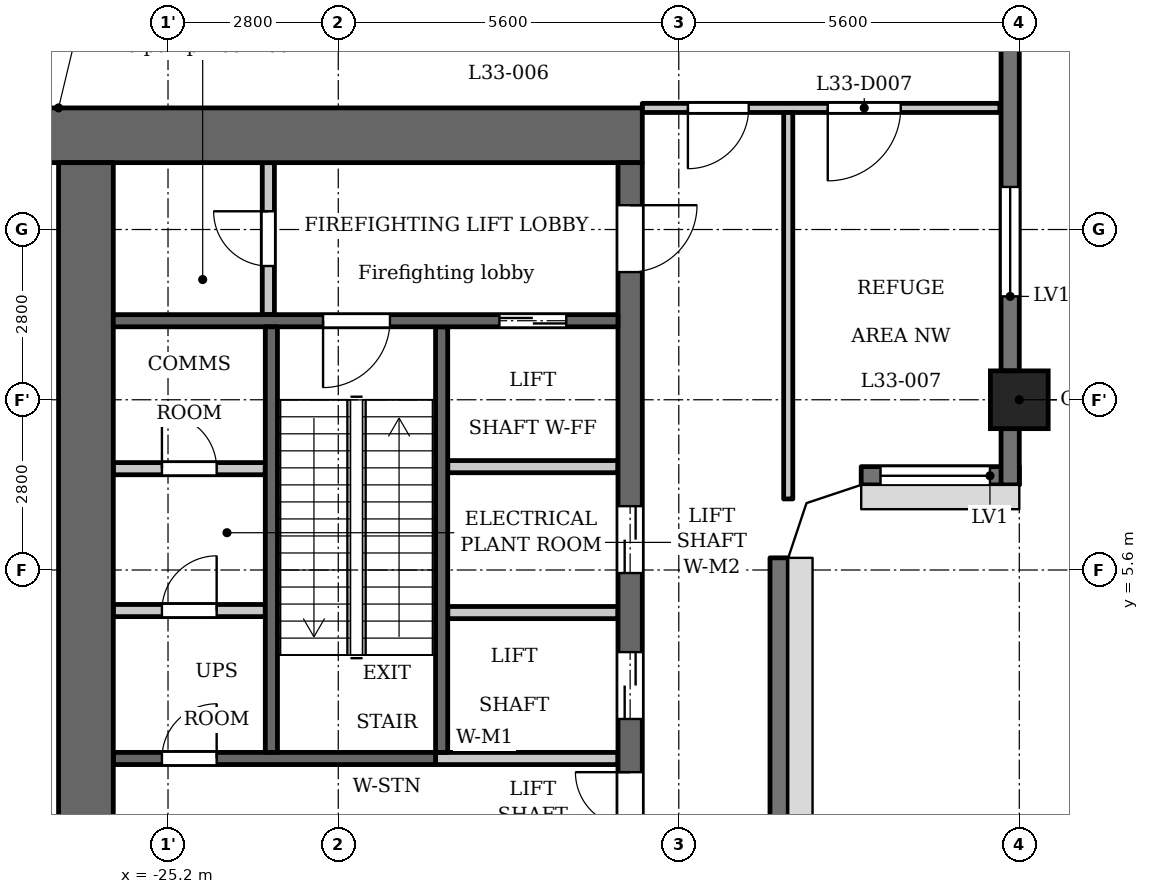
"""IFC4 building model, lengths in metres.
Left out: names, types, materials, properties, quantities, classifications, styles, units other than length and angle.
Written with IfcOpenShell. Run it as: python <this file> out.ifc"""

import sys

from ifc_helpers import new_model, si_unit, direction, frame, frame_2d, origin, origin_2d, place, context, subcontext, project, spatial, polyline, rectangle, outline, extrude, element, fill, save


model = new_model("IFC4")
c1 = context("Model", 3, precision=1e-05, world=origin(), true_north=direction((0.0, 1.0)))
c2 = subcontext(c1, "Body", "Model", "MODEL_VIEW")
j1 = project(units=[si_unit("LENGTHUNIT", "METRE"), si_unit("PLANEANGLEUNIT", "RADIAN")], contexts=[c1])
p1 = place(None, origin())
s1 = spatial("IfcSite", under=j1, at=p1, CompositionType="ELEMENT")
p2 = place(p1, origin())
s2 = spatial("IfcBuilding", under=s1, at=p2, CompositionType="ELEMENT")
p3 = place(p2, frame((0.0, 0.0, 130.7)))
s3 = spatial("IfcBuildingStorey", under=s2, at=p3, CompositionType="ELEMENT", Elevation=130.7)
p4 = place(p3, frame((-11.2, 8.4, 0.0), z_axis=(0.0, 0.0, 1.0), x_axis=(1.0, 0.0, 0.0)))
e1 = element("IfcColumn", 1, at=p4, inside=s3, PredefinedType="COLUMN", context=c2, shape_type="SweptSolid", body=[
    extrude(rectangle(XDim=0.95, YDim=0.95, at=origin_2d()), origin(), (0.0, 0.0, 1.0), 5.4),
])
p5 = place(p3, frame((-15.15, -5.8, 0.0), z_axis=(0.0, 0.0, 1.0), x_axis=(0.0, 1.0, 0.0)))
e2 = element("IfcWall", 2, at=p5, inside=s3, PredefinedType="SOLIDWALL", context=c2, shape_type="SweptSolid", body=[
    extrude(rectangle(XDim=11.6, YDim=0.3, at=frame_2d((5.8, 0.0))), origin(), (0.0, 0.0, 1.0), 5.1),
])
p6 = place(p3, frame((-13.8, 7.15, 0.0), z_axis=(0.0, 0.0, 1.0), x_axis=(1.0, 0.0, 0.0)))
e3 = element("IfcWall", 3, at=p6, inside=s3, PredefinedType="SOLIDWALL", context=c2, shape_type="SweptSolid", body=[
    extrude(rectangle(XDim=2.6, YDim=0.3, at=frame_2d((1.3, 0.0))), origin(), (0.0, 0.0, 1.0), 5.1),
])
p7 = place(p6, frame((0.317, 0.0, 0.9)))
e4 = element("IfcOpeningElement", 4, at=p7, cuts=e3, PredefinedType="OPENING", context=c2, shape_type="SweptSolid", body=[
    extrude(rectangle(XDim=1.8, YDim=1.5, at=frame_2d((0.9, 0.75))), frame((0.0, 0.16, 0.0), z_axis=(0.0, -1.0, 0.0), x_axis=(1.0, 0.0, 0.0)), (0.0, 0.0, 1.0), 0.32),
])
p8 = place(p3, frame((-11.35, 7.0, 0.0), z_axis=(0.0, 0.0, 1.0), x_axis=(0.0, 1.0, 0.0)))
e5 = element("IfcWall", 5, at=p8, inside=s3, PredefinedType="SOLIDWALL", context=c2, shape_type="SweptSolid", body=[
    extrude(rectangle(XDim=0.925, YDim=0.3, at=frame_2d((0.462, 0.0))), origin(), (0.0, 0.0, 1.0), 5.1),
])
p9 = place(p3, frame((-11.35, 8.875, 0.0), z_axis=(0.0, 0.0, 1.0), x_axis=(0.0, 1.0, 0.0)))
e6 = element("IfcWall", 6, at=p9, inside=s3, PredefinedType="SOLIDWALL", context=c2, shape_type="SweptSolid", body=[
    extrude(rectangle(XDim=6.1, YDim=0.3, at=frame_2d((3.05, 0.0))), origin(), (0.0, 0.0, 1.0), 5.1),
])
p10 = place(p9, frame((1.225, 0.0, 0.9)))
e7 = element("IfcOpeningElement", 7, at=p10, cuts=e6, PredefinedType="OPENING", context=c2, shape_type="SweptSolid", body=[
    extrude(rectangle(XDim=1.8, YDim=1.5, at=frame_2d((0.9, 0.75))), frame((0.0, 0.16, 0.0), z_axis=(0.0, -1.0, 0.0), x_axis=(1.0, 0.0, 0.0)), (0.0, 0.0, 1.0), 0.32),
])
p11 = place(p3, frame((-20.7, 2.6, 0.0), z_axis=(0.0, 0.0, 1.0), x_axis=(0.0, 1.0, 0.0)))
e8 = element("IfcWall", 8, at=p11, inside=s3, PredefinedType="SHEAR", context=c2, shape_type="SweptSolid", body=[
    extrude(rectangle(XDim=7.0, YDim=0.2, at=frame_2d((3.5, 0.0))), origin(), (0.0, 0.0, 1.0), 5.1),
])
p12 = place(p3, frame((-20.8, 2.5, 0.0), z_axis=(0.0, 0.0, 1.0), x_axis=(-1.0, 0.0, 0.0)))
e9 = element("IfcWall", 9, at=p12, inside=s3, PredefinedType="SHEAR", context=c2, shape_type="SweptSolid", body=[
    extrude(rectangle(XDim=5.3, YDim=0.2, at=frame_2d((2.65, 0.0))), origin(), (0.0, 0.0, 1.0), 5.1),
])
p13 = place(p12, frame((3.6, 0.0, 0.0)))
e10 = element("IfcOpeningElement", 10, at=p13, cuts=e9, PredefinedType="OPENING", context=c2, shape_type="SweptSolid", body=[
    extrude(rectangle(XDim=0.9, YDim=2.1, at=frame_2d((0.45, 1.05))), frame((0.0, 0.11, 0.0), z_axis=(0.0, -1.0, 0.0), x_axis=(1.0, 0.0, 0.0)), (0.0, 0.0, 1.0), 0.22),
])
p14 = place(p3, frame((-17.4, 12.75, 0.0), z_axis=(0.0, 0.0, 1.0), x_axis=(-1.0, 0.0, 0.0)))
e11 = element("IfcWall", 11, at=p14, inside=s3, PredefinedType="SHEAR", context=c2, shape_type="SweptSolid", body=[
    extrude(rectangle(XDim=10.4, YDim=0.9, at=frame_2d((5.2, 0.0))), origin(), (0.0, 0.0, 1.0), 5.1),
])
p15 = place(p3, frame((-17.6, -12.3, 0.0), z_axis=(0.0, 0.0, 1.0), x_axis=(0.0, 1.0, 0.0)))
e12 = element("IfcWall", 12, at=p15, inside=s3, PredefinedType="SHEAR", context=c2, shape_type="SweptSolid", body=[
    extrude(rectangle(XDim=24.6, YDim=0.4, at=frame_2d((12.3, 0.0))), origin(), (0.0, 0.0, 1.0), 5.1),
])
p16 = place(p15, frame((15.45, 0.0, 0.0)))
e13 = element("IfcOpeningElement", 13, at=p16, cuts=e12, PredefinedType="OPENING", context=c2, shape_type="SweptSolid", body=[
    extrude(rectangle(XDim=1.1, YDim=2.1, at=frame_2d((0.55, 1.05))), frame((0.0, 0.21, 0.0), z_axis=(0.0, -1.0, 0.0), x_axis=(1.0, 0.0, 0.0)), (0.0, 0.0, 1.0), 0.42),
])
p17 = place(p15, frame((17.85, 0.0, 0.0)))
e14 = element("IfcOpeningElement", 14, at=p17, cuts=e12, PredefinedType="OPENING", context=c2, shape_type="SweptSolid", body=[
    extrude(rectangle(XDim=1.1, YDim=2.1, at=frame_2d((0.55, 1.05))), frame((0.0, 0.21, 0.0), z_axis=(0.0, -1.0, 0.0), x_axis=(1.0, 0.0, 0.0)), (0.0, 0.0, 1.0), 0.42),
])
p18 = place(p15, frame((22.8, 0.0, 0.0)))
e15 = element("IfcOpeningElement", 15, at=p18, cuts=e12, PredefinedType="OPENING", context=c2, shape_type="SweptSolid", body=[
    extrude(rectangle(XDim=1.1, YDim=2.1, at=frame_2d((0.55, 1.05))), frame((0.0, 0.21, 0.0), z_axis=(0.0, -1.0, 0.0), x_axis=(1.0, 0.0, 0.0)), (0.0, 0.0, 1.0), 0.42),
])
p19 = place(p15, frame((0.7, 0.0, 0.0)))
e16 = element("IfcOpeningElement", 16, at=p19, cuts=e12, PredefinedType="OPENING", context=c2, shape_type="SweptSolid", body=[
    extrude(rectangle(XDim=1.1, YDim=2.1, at=frame_2d((0.55, 1.05))), frame((0.0, 0.21, 0.0), z_axis=(0.0, -1.0, 0.0), x_axis=(1.0, 0.0, 0.0)), (0.0, 0.0, 1.0), 0.42),
])
p20 = place(p15, frame((12.775, 0.0, 0.0)))
e17 = element("IfcOpeningElement", 17, at=p20, cuts=e12, PredefinedType="OPENING", context=c2, shape_type="SweptSolid", body=[
    extrude(rectangle(XDim=1.8, YDim=2.1, at=frame_2d((0.9, 1.05))), frame((0.0, 0.21, 0.0), z_axis=(0.0, -1.0, 0.0), x_axis=(1.0, 0.0, 0.0)), (0.0, 0.0, 1.0), 0.42),
])
p21 = place(p3, frame((-26.55, -12.3, 0.0), z_axis=(0.0, 0.0, 1.0), x_axis=(0.0, 1.0, 0.0)))
e18 = element("IfcWall", 18, at=p21, inside=s3, PredefinedType="SHEAR", context=c2, shape_type="SweptSolid", body=[
    extrude(rectangle(XDim=24.6, YDim=0.9, at=frame_2d((12.3, 0.0))), origin(), (0.0, 0.0, 1.0), 5.1),
])
p22 = place(p3, frame((-23.55, 9.8, 0.0), z_axis=(0.0, 0.0, 1.0), x_axis=(0.0, 1.0, 0.0)))
e19 = element("IfcWall", 19, at=p22, inside=s3, PredefinedType="PARTITIONING", context=c2, shape_type="SweptSolid", body=[
    extrude(rectangle(XDim=2.5, YDim=0.2, at=frame_2d((1.25, 0.0))), origin(), (0.0, 0.0, 1.0), 5.1),
])
p23 = place(p22, frame((0.8, 0.0, 0.0)))
e20 = element("IfcOpeningElement", 20, at=p23, cuts=e19, PredefinedType="OPENING", context=c2, shape_type="SweptSolid", body=[
    extrude(rectangle(XDim=0.9, YDim=2.1, at=frame_2d((0.45, 1.05))), frame((0.0, 0.11, 0.0), z_axis=(0.0, -1.0, 0.0), x_axis=(1.0, 0.0, 0.0)), (0.0, 0.0, 1.0), 0.22),
])
p24 = place(p3, frame((-23.6, 4.933, 0.0), z_axis=(0.0, 0.0, 1.0), x_axis=(-1.0, 0.0, 0.0)))
e21 = element("IfcWall", 21, at=p24, inside=s3, PredefinedType="PARTITIONING", context=c2, shape_type="SweptSolid", body=[
    extrude(rectangle(XDim=2.5, YDim=0.2, at=frame_2d((1.25, 0.0))), origin(), (0.0, 0.0, 1.0), 5.1),
])
p25 = place(p24, frame((0.8, 0.0, 0.0)))
e22 = element("IfcOpeningElement", 22, at=p25, cuts=e21, PredefinedType="OPENING", context=c2, shape_type="SweptSolid", body=[
    extrude(rectangle(XDim=0.9, YDim=2.1, at=frame_2d((0.45, 1.05))), frame((0.0, 0.11, 0.0), z_axis=(0.0, -1.0, 0.0), x_axis=(1.0, 0.0, 0.0)), (0.0, 0.0, 1.0), 0.22),
])
p26 = place(p3, frame((-23.6, 7.267, 0.0), z_axis=(0.0, 0.0, 1.0), x_axis=(-1.0, 0.0, 0.0)))
e23 = element("IfcWall", 23, at=p26, inside=s3, PredefinedType="PARTITIONING", context=c2, shape_type="SweptSolid", body=[
    extrude(rectangle(XDim=2.5, YDim=0.2, at=frame_2d((1.25, 0.0))), origin(), (0.0, 0.0, 1.0), 5.1),
])
p27 = place(p26, frame((0.8, 0.0, 0.0)))
e24 = element("IfcOpeningElement", 24, at=p27, cuts=e23, PredefinedType="OPENING", context=c2, shape_type="SweptSolid", body=[
    extrude(rectangle(XDim=0.9, YDim=2.1, at=frame_2d((0.45, 1.05))), frame((0.0, 0.11, 0.0), z_axis=(0.0, -1.0, 0.0), x_axis=(1.0, 0.0, 0.0)), (0.0, 0.0, 1.0), 0.22),
])
p28 = place(p3, frame((-17.8, 2.5, 0.0), z_axis=(0.0, 0.0, 1.0), x_axis=(-1.0, 0.0, 0.0)))
e25 = element("IfcWall", 25, at=p28, inside=s3, PredefinedType="PARTITIONING", context=c2, shape_type="SweptSolid", body=[
    extrude(rectangle(XDim=3.0, YDim=0.2, at=frame_2d((1.5, 0.0))), origin(), (0.0, 0.0, 1.0), 5.1),
])
for number, where, z_axis, x_axis in (
    (26, (-17.8, 4.9, 0.0), (0.0, 0.0, 1.0), (-1.0, 0.0, 0.0)),
    (27, (-17.8, 7.3, 0.0), (0.0, 0.0, 1.0), (-1.0, 0.0, 0.0)),
):
    element("IfcWall", number, at=place(p3, frame(where, z_axis=z_axis, x_axis=x_axis)), inside=s3, PredefinedType="PARTITIONING", context=c2, shape_type="SweptSolid", body=[
        extrude(rectangle(XDim=2.8, YDim=0.2, at=frame_2d((1.4, 0.0))), origin(), (0.0, 0.0, 1.0), 5.1),
    ])
p29 = place(p3, frame((-17.8, 9.7, 0.0), z_axis=(0.0, 0.0, 1.0), x_axis=(-1.0, 0.0, 0.0)))
e28 = element("IfcWall", 28, at=p29, inside=s3, PredefinedType="SHEAR", context=c2, shape_type="SweptSolid", body=[
    extrude(rectangle(XDim=8.3, YDim=0.2, at=frame_2d((4.15, 0.0))), origin(), (0.0, 0.0, 1.0), 5.1),
])
p30 = place(p29, frame((0.85, 0.0, 0.0)))
e29 = element("IfcOpeningElement", 29, at=p30, cuts=e28, PredefinedType="OPENING", context=c2, shape_type="SweptSolid", body=[
    extrude(rectangle(XDim=1.1, YDim=2.1, at=frame_2d((0.55, 1.05))), frame((0.0, 0.11, 0.0), z_axis=(0.0, -1.0, 0.0), x_axis=(1.0, 0.0, 0.0)), (0.0, 0.0, 1.0), 0.22),
])
p31 = place(p29, frame((3.75, 0.0, 0.0)))
e30 = element("IfcOpeningElement", 30, at=p31, cuts=e28, PredefinedType="OPENING", context=c2, shape_type="SweptSolid", body=[
    extrude(rectangle(XDim=1.1, YDim=2.1, at=frame_2d((0.55, 1.05))), frame((0.0, 0.11, 0.0), z_axis=(0.0, -1.0, 0.0), x_axis=(1.0, 0.0, 0.0)), (0.0, 0.0, 1.0), 0.22),
])
p32 = place(p3, frame((-23.5, 2.6, 0.0), z_axis=(0.0, 0.0, 1.0), x_axis=(0.0, 1.0, 0.0)))
e31 = element("IfcWall", 31, at=p32, inside=s3, PredefinedType="SHEAR", context=c2, shape_type="SweptSolid", body=[
    extrude(rectangle(XDim=7.0, YDim=0.2, at=frame_2d((3.5, 0.0))), origin(), (0.0, 0.0, 1.0), 5.1),
])
p33 = place(p3, frame((-17.4, 13.2, 0.0), z_axis=(0.0, 0.0, 1.0), x_axis=(1.0, 0.0, 0.0)))
e32 = element("IfcWall", 32, at=p33, inside=s3, PredefinedType="PARTITIONING", context=c2, shape_type="SweptSolid", body=[
    extrude(rectangle(XDim=5.88, YDim=0.15, at=frame_2d((2.94, 0.0))), origin(), (0.0, 0.0, 1.0), 5.1),
])
p34 = place(p33, frame((0.75, 0.0, 0.0)))
e33 = element("IfcOpeningElement", 33, at=p34, cuts=e32, PredefinedType="OPENING", context=c2, shape_type="SweptSolid", body=[
    extrude(rectangle(XDim=1.0, YDim=2.1, at=frame_2d((0.5, 1.05))), frame((0.0, 0.085, 0.0), z_axis=(0.0, -1.0, 0.0), x_axis=(1.0, 0.0, 0.0)), (0.0, 0.0, 1.0), 0.17),
])
p35 = place(p33, frame((3.05, 0.0, 0.0)))
e34 = element("IfcOpeningElement", 34, at=p35, cuts=e32, PredefinedType="OPENING", context=c2, shape_type="SweptSolid", body=[
    extrude(rectangle(XDim=1.2, YDim=2.1, at=frame_2d((0.6, 1.05))), frame((0.0, 0.085, 0.0), z_axis=(0.0, -1.0, 0.0), x_axis=(1.0, 0.0, 0.0)), (0.0, 0.0, 1.0), 0.17),
])
p36 = place(p3, frame((-15.0, 6.769, 0.0), z_axis=(0.0, 0.0, 1.0), x_axis=(0.0, 1.0, 0.0)))
e35 = element("IfcWall", 35, at=p36, inside=s3, PredefinedType="PARTITIONING", context=c2, shape_type="SweptSolid", body=[
    extrude(rectangle(XDim=6.356, YDim=0.15, at=frame_2d((3.178, 0.0))), origin(), (0.0, 0.0, 1.0), 5.1),
])
p37 = place(p3, origin())
e36 = element("IfcWall", 36, at=p37, inside=s3, PredefinedType="SOLIDWALL", context=c2, shape_type="SweptSolid", body=[
    extrude(outline(polyline([(-15.0, 5.8), (-14.7, 6.7), (-13.8, 7.0), (-13.8, 7.3), (-13.849, 7.3), (-14.937, 6.937), (-15.3, 5.849), (-15.3, 5.8), (-15.0, 5.8)])), origin(), (0.0, 0.0, 1.0), 5.1),
])
p38 = place(p16, origin())
e37 = element("IfcDoor", 37, at=p38, inside=s3, OperationType="DOUBLE_DOOR_SLIDING", PredefinedType="DOOR", context=c2, shape_type="SweptSolid", body=[
    extrude(rectangle(XDim=1.1, YDim=2.1, at=frame_2d((0.55, 1.05))), frame((0.0, 0.025, 0.0), z_axis=(0.0, -1.0, 0.0), x_axis=(1.0, 0.0, 0.0)), (0.0, 0.0, 1.0), 0.05),
])
fill(e13, e37)
p39 = place(p17, origin())
e38 = element("IfcDoor", 38, at=p39, inside=s3, OperationType="DOUBLE_DOOR_SLIDING", PredefinedType="DOOR", context=c2, shape_type="SweptSolid", body=[
    extrude(rectangle(XDim=1.1, YDim=2.1, at=frame_2d((0.55, 1.05))), frame((0.0, 0.025, 0.0), z_axis=(0.0, -1.0, 0.0), x_axis=(1.0, 0.0, 0.0)), (0.0, 0.0, 1.0), 0.05),
])
fill(e14, e38)
p40 = place(p30, origin())
e39 = element("IfcDoor", 39, at=p40, inside=s3, OperationType="DOUBLE_DOOR_SLIDING", PredefinedType="DOOR", context=c2, shape_type="SweptSolid", body=[
    extrude(rectangle(XDim=1.1, YDim=2.1, at=frame_2d((0.55, 1.05))), frame((0.0, 0.025, 0.0), z_axis=(0.0, -1.0, 0.0), x_axis=(1.0, 0.0, 0.0)), (0.0, 0.0, 1.0), 0.05),
])
fill(e29, e39)
p41 = place(p18, origin())
e40 = element("IfcDoor", 40, at=p41, inside=s3, OperationType="SINGLE_SWING_RIGHT", PredefinedType="DOOR", context=c2, shape_type="SweptSolid", body=[
    extrude(rectangle(XDim=1.1, YDim=2.1, at=frame_2d((0.55, 1.05))), frame((0.0, 0.025, 0.0), z_axis=(0.0, -1.0, 0.0), x_axis=(1.0, 0.0, 0.0)), (0.0, 0.0, 1.0), 0.05),
])
fill(e15, e40)
p42 = place(p23, origin())
e41 = element("IfcDoor", 41, at=p42, inside=s3, OperationType="SINGLE_SWING_LEFT", PredefinedType="DOOR", context=c2, shape_type="SweptSolid", body=[
    extrude(rectangle(XDim=0.9, YDim=2.1, at=frame_2d((0.45, 1.05))), frame((0.0, 0.025, 0.0), z_axis=(0.0, -1.0, 0.0), x_axis=(1.0, 0.0, 0.0)), (0.0, 0.0, 1.0), 0.05),
])
fill(e20, e41)
p43 = place(p31, origin())
e42 = element("IfcDoor", 42, at=p43, inside=s3, OperationType="SINGLE_SWING_LEFT", PredefinedType="DOOR", context=c2, shape_type="SweptSolid", body=[
    extrude(rectangle(XDim=1.1, YDim=2.1, at=frame_2d((0.55, 1.05))), frame((0.0, 0.025, 0.0), z_axis=(0.0, -1.0, 0.0), x_axis=(1.0, 0.0, 0.0)), (0.0, 0.0, 1.0), 0.05),
])
fill(e30, e42)
p44 = place(p20, origin())
e43 = element("IfcDoor", 43, at=p44, inside=s3, OperationType="DOUBLE_DOOR_SINGLE_SWING", PredefinedType="DOOR", context=c2, shape_type="SweptSolid", body=[
    extrude(rectangle(XDim=1.8, YDim=2.1, at=frame_2d((0.9, 1.05))), frame((0.0, 0.025, 0.0), z_axis=(0.0, -1.0, 0.0), x_axis=(1.0, 0.0, 0.0)), (0.0, 0.0, 1.0), 0.05),
])
fill(e17, e43)
p45 = place(p25, origin())
e44 = element("IfcDoor", 44, at=p45, inside=s3, OperationType="SINGLE_SWING_LEFT", PredefinedType="DOOR", context=c2, shape_type="SweptSolid", body=[
    extrude(rectangle(XDim=0.9, YDim=2.1, at=frame_2d((0.45, 1.05))), frame((0.0, 0.025, 0.0), z_axis=(0.0, -1.0, 0.0), x_axis=(1.0, 0.0, 0.0)), (0.0, 0.0, 1.0), 0.05),
])
fill(e22, e44)
p46 = place(p27, origin())
e45 = element("IfcDoor", 45, at=p46, inside=s3, OperationType="SINGLE_SWING_RIGHT", PredefinedType="DOOR", context=c2, shape_type="SweptSolid", body=[
    extrude(rectangle(XDim=0.9, YDim=2.1, at=frame_2d((0.45, 1.05))), frame((0.0, 0.025, 0.0), z_axis=(0.0, -1.0, 0.0), x_axis=(1.0, 0.0, 0.0)), (0.0, 0.0, 1.0), 0.05),
])
fill(e24, e45)
p47 = place(p13, origin())
e46 = element("IfcDoor", 46, at=p47, inside=s3, OperationType="SINGLE_SWING_LEFT", PredefinedType="DOOR", context=c2, shape_type="SweptSolid", body=[
    extrude(rectangle(XDim=0.9, YDim=2.1, at=frame_2d((0.45, 1.05))), frame((0.0, 0.025, 0.0), z_axis=(0.0, -1.0, 0.0), x_axis=(1.0, 0.0, 0.0)), (0.0, 0.0, 1.0), 0.05),
])
fill(e10, e46)
p48 = place(p34, origin())
e47 = element("IfcDoor", 47, at=p48, inside=s3, OperationType="SINGLE_SWING_LEFT", PredefinedType="DOOR", context=c2, shape_type="SweptSolid", body=[
    extrude(rectangle(XDim=1.0, YDim=2.1, at=frame_2d((0.5, 1.05))), frame((0.0, 0.025, 0.0), z_axis=(0.0, -1.0, 0.0), x_axis=(1.0, 0.0, 0.0)), (0.0, 0.0, 1.0), 0.05),
])
fill(e33, e47)
p49 = place(p35, origin())
e48 = element("IfcDoor", 48, at=p49, inside=s3, OperationType="SINGLE_SWING_LEFT", PredefinedType="DOOR", context=c2, shape_type="SweptSolid", body=[
    extrude(rectangle(XDim=1.2, YDim=2.1, at=frame_2d((0.6, 1.05))), frame((0.0, 0.025, 0.0), z_axis=(0.0, -1.0, 0.0), x_axis=(1.0, 0.0, 0.0)), (0.0, 0.0, 1.0), 0.05),
])
fill(e34, e48)
p50 = place(p7, origin())
e49 = element("IfcWindow", 49, at=p50, inside=s3, PartitioningType="SINGLE_PANEL", PredefinedType="WINDOW", context=c2, shape_type="SweptSolid", body=[
    extrude(rectangle(XDim=1.8, YDim=1.5, at=frame_2d((0.9, 0.75))), frame((0.0, 0.03, 0.0), z_axis=(0.0, -1.0, 0.0), x_axis=(1.0, 0.0, 0.0)), (0.0, 0.0, 1.0), 0.06),
])
fill(e4, e49)
p51 = place(p10, origin())
e50 = element("IfcWindow", 50, at=p51, inside=s3, PartitioningType="SINGLE_PANEL", PredefinedType="WINDOW", context=c2, shape_type="SweptSolid", body=[
    extrude(rectangle(XDim=1.8, YDim=1.5, at=frame_2d((0.9, 0.75))), frame((0.0, 0.03, 0.0), z_axis=(0.0, -1.0, 0.0), x_axis=(1.0, 0.0, 0.0)), (0.0, 0.0, 1.0), 0.06),
])
fill(e7, e50)
save(model, sys.argv[1])
